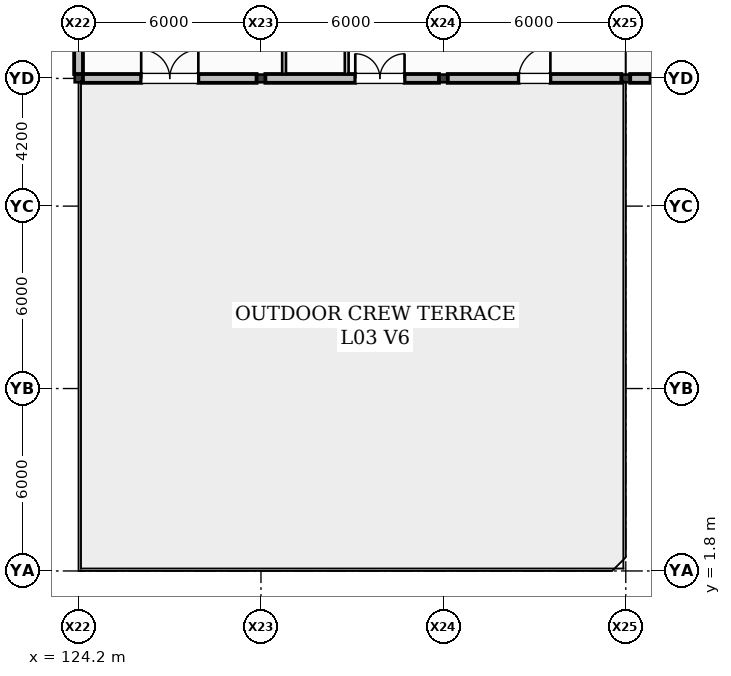
"""IFC4 building model, lengths in metres.
Left out: names, types, materials, properties, quantities, classifications, styles, units other than length and angle.
Written with IfcOpenShell. Run it as: python <this file> out.ifc"""

import sys

from ifc_helpers import new_model, si_unit, direction, frame, frame_2d, origin, origin_2d, place, context, subcontext, project, spatial, rectangle, i_section, extrude, element, fill, save


model = new_model("IFC4")
c1 = context("Model", 3, precision=1e-05, world=origin(), true_north=direction((0.0, 1.0)))
c2 = subcontext(c1, "Body", "Model", "MODEL_VIEW")
j1 = project(units=[si_unit("LENGTHUNIT", "METRE"), si_unit("PLANEANGLEUNIT", "RADIAN")], contexts=[c1])
p1 = place(None, origin())
s1 = spatial("IfcSite", under=j1, at=p1, CompositionType="ELEMENT")
p2 = place(p1, origin())
s2 = spatial("IfcBuilding", under=s1, at=p2, CompositionType="ELEMENT")
p3 = place(p2, frame((0.0, 0.0, 10.0)))
s3 = spatial("IfcBuildingStorey", under=s2, at=p3, CompositionType="ELEMENT", Elevation=10.0)
for number, where, z_axis, x_axis in (
    (1, (124.2, 18.0, 0.0), (0.0, 0.0, 1.0), (1.0, 0.0, 0.0)),
    (2, (130.2, 18.0, 0.0), (0.0, 0.0, 1.0), (1.0, 0.0, 0.0)),
    (3, (136.2, 18.0, 0.0), (0.0, 0.0, 1.0), (1.0, 0.0, 0.0)),
    (4, (142.2, 18.0, 0.0), (0.0, 0.0, 1.0), (1.0, 0.0, 0.0)),
):
    element("IfcColumn", number, at=place(p3, frame(where, z_axis=z_axis, x_axis=x_axis)), inside=s3, PredefinedType="COLUMN", context=c2, shape_type="SweptSolid", body=[
        extrude(i_section(OverallWidth=0.254, OverallDepth=0.253, WebThickness=0.009, FlangeThickness=0.014, at=origin_2d()), origin(), (0.0, 0.0, 1.0), 4.0),
    ])
p4 = place(p3, frame((124.345, 18.0, 0.0), z_axis=(0.0, 0.0, 1.0), x_axis=(1.0, 0.0, 0.0)))
e5 = element("IfcWall", 5, at=p4, inside=s3, PredefinedType="STANDARD", context=c2, shape_type="SweptSolid", body=[
    extrude(rectangle(XDim=5.71, YDim=0.29, at=frame_2d((2.855, 0.0))), origin(), (0.0, 0.0, 1.0), 4.0),
])
p5 = place(p4, frame((1.915, 0.0, 0.0)))
e6 = element("IfcOpeningElement", 6, at=p5, cuts=e5, PredefinedType="OPENING", context=c2, shape_type="SweptSolid", body=[
    extrude(rectangle(XDim=1.88, YDim=2.28, at=frame_2d((0.94, 1.14))), frame((0.0, 0.155, 0.0), z_axis=(0.0, -1.0, 0.0), x_axis=(1.0, 0.0, 0.0)), (0.0, 0.0, 1.0), 0.31),
])
p6 = place(p3, frame((130.345, 18.0, 0.0), z_axis=(0.0, 0.0, 1.0), x_axis=(1.0, 0.0, 0.0)))
e7 = element("IfcWall", 7, at=p6, inside=s3, PredefinedType="STANDARD", context=c2, shape_type="SweptSolid", body=[
    extrude(rectangle(XDim=5.71, YDim=0.29, at=frame_2d((2.855, 0.0))), origin(), (0.0, 0.0, 1.0), 4.0),
])
p7 = place(p6, frame((2.958, 0.0, 0.0)))
e8 = element("IfcOpeningElement", 8, at=p7, cuts=e7, PredefinedType="OPENING", context=c2, shape_type="SweptSolid", body=[
    extrude(rectangle(XDim=1.62, YDim=2.2, at=frame_2d((0.81, 1.1))), frame((0.0, 0.155, 0.0), z_axis=(0.0, -1.0, 0.0), x_axis=(1.0, 0.0, 0.0)), (0.0, 0.0, 1.0), 0.31),
])
p8 = place(p3, frame((136.345, 18.0, 0.0), z_axis=(0.0, 0.0, 1.0), x_axis=(1.0, 0.0, 0.0)))
e9 = element("IfcWall", 9, at=p8, inside=s3, PredefinedType="STANDARD", context=c2, shape_type="SweptSolid", body=[
    extrude(rectangle(XDim=5.71, YDim=0.29, at=frame_2d((2.855, 0.0))), origin(), (0.0, 0.0, 1.0), 4.0),
])
p9 = place(p8, frame((2.335, 0.0, 0.0)))
e10 = element("IfcOpeningElement", 10, at=p9, cuts=e9, PredefinedType="OPENING", context=c2, shape_type="SweptSolid", body=[
    extrude(rectangle(XDim=1.04, YDim=2.16, at=frame_2d((0.52, 1.08))), frame((0.0, 0.155, 0.0), z_axis=(0.0, -1.0, 0.0), x_axis=(1.0, 0.0, 0.0)), (0.0, 0.0, 1.0), 0.31),
])
p10 = place(p3, frame((142.345, 18.0, 0.0), z_axis=(0.0, 0.0, 1.0), x_axis=(1.0, 0.0, 0.0)))
e11 = element("IfcWall", 11, at=p10, inside=s3, PredefinedType="STANDARD", context=c2, shape_type="SweptSolid", body=[
    extrude(rectangle(XDim=5.71, YDim=0.29, at=frame_2d((2.855, 0.0))), origin(), (0.0, 0.0, 1.0), 4.0),
])
p11 = place(p10, frame((0.67, 0.0, 1.42)))
e12 = element("IfcOpeningElement", 12, at=p11, cuts=e11, PredefinedType="OPENING", context=c2, shape_type="SweptSolid", body=[
    extrude(rectangle(XDim=1.32, YDim=1.32, at=frame_2d((0.66, 0.66))), frame((0.0, 0.155, 0.0), z_axis=(0.0, -1.0, 0.0), x_axis=(1.0, 0.0, 0.0)), (0.0, 0.0, 1.0), 0.31),
])
p12 = place(p10, frame((3.504, 0.0, 1.28)))
e13 = element("IfcOpeningElement", 13, at=p12, cuts=e11, PredefinedType="OPENING", context=c2, shape_type="SweptSolid", body=[
    extrude(rectangle(XDim=1.56, YDim=1.56, at=frame_2d((0.78, 0.78))), frame((0.0, 0.155, 0.0), z_axis=(0.0, -1.0, 0.0), x_axis=(1.0, 0.0, 0.0)), (0.0, 0.0, 1.0), 0.31),
])
p13 = place(p3, frame((124.2, 23.855, 0.0), z_axis=(0.0, 0.0, 1.0), x_axis=(0.0, -1.0, 0.0)))
e14 = element("IfcWall", 14, at=p13, inside=s3, PredefinedType="STANDARD", context=c2, shape_type="SweptSolid", body=[
    extrude(rectangle(XDim=5.71, YDim=0.29, at=frame_2d((2.855, 0.0))), origin(), (0.0, 0.0, 1.0), 2.1),
])
p14 = place(p13, frame((1.092, 0.0, 0.82)))
e15 = element("IfcOpeningElement", 15, at=p14, cuts=e14, PredefinedType="OPENING", context=c2, shape_type="SweptSolid", body=[
    extrude(rectangle(XDim=0.96, YDim=0.96, at=frame_2d((0.48, 0.48))), frame((0.0, 0.155, 0.0), z_axis=(0.0, -1.0, 0.0), x_axis=(1.0, 0.0, 0.0)), (0.0, 0.0, 1.0), 0.31),
])
p15 = place(p2, frame((0.0, 0.0, 25.2)))
s4 = spatial("IfcBuildingStorey", under=s2, at=p15, CompositionType="ELEMENT", Elevation=25.2)
p16 = place(p15, frame((122.973, 18.0, -15.2), z_axis=(0.0, 0.0, 1.0), x_axis=(1.0, 0.0, 0.0)))
e16 = element("IfcWall", 16, at=p16, inside=s4, PredefinedType="STANDARD", context=c2, shape_type="SweptSolid", body=[
    extrude(rectangle(XDim=1.182, YDim=0.265, at=frame_2d((0.591, 0.0))), origin(), (0.0, 0.0, 1.0), 2.417),
])
p17 = place(p3, frame((130.96, 24.097, 0.0), z_axis=(0.0, 0.0, 1.0), x_axis=(0.0, -1.0, 0.0)))
e17 = element("IfcWall", 17, at=p17, inside=s3, PredefinedType="PARTITIONING", context=c2, shape_type="SweptSolid", body=[
    extrude(rectangle(XDim=5.952, YDim=0.125, at=frame_2d((2.976, 0.0))), origin(), (0.0, 0.0, 1.0), 3.74),
])
p18 = place(p3, frame((133.02, 18.145, 0.0), z_axis=(0.0, 0.0, 1.0), x_axis=(0.0, 1.0, 0.0)))
e18 = element("IfcWall", 18, at=p18, inside=s3, PredefinedType="PARTITIONING", context=c2, shape_type="SweptSolid", body=[
    extrude(rectangle(XDim=6.022, YDim=0.125, at=frame_2d((3.011, 0.0))), origin(), (0.0, 0.0, 1.0), 3.74),
])
p19 = place(p18, frame((2.447, 0.0, 0.0)))
e19 = element("IfcOpeningElement", 19, at=p19, cuts=e18, PredefinedType="OPENING", context=c2, shape_type="SweptSolid", body=[
    extrude(rectangle(XDim=0.9, YDim=2.1, at=frame_2d((0.45, 1.05))), frame((0.0, 0.073, 0.0), z_axis=(0.0, -1.0, 0.0), x_axis=(1.0, 0.0, 0.0)), (0.0, 0.0, 1.0), 0.145),
])
p20 = place(p5, frame((1.88, 0.0, 0.0), z_axis=(0.0, 0.0, 1.0), x_axis=(-1.0, 0.0, 0.0)))
e20 = element("IfcDoor", 20, at=p20, inside=s3, OperationType="DOUBLE_DOOR_SINGLE_SWING", PredefinedType="DOOR", context=c2, shape_type="SweptSolid", body=[
    extrude(rectangle(XDim=1.88, YDim=2.28, at=frame_2d((0.94, 1.14))), frame((0.0, 0.025, 0.0), z_axis=(0.0, -1.0, 0.0), x_axis=(1.0, 0.0, 0.0)), (0.0, 0.0, 1.0), 0.05),
])
fill(e6, e20)
p21 = place(p7, frame((1.62, 0.0, 0.0), z_axis=(0.0, 0.0, 1.0), x_axis=(-1.0, 0.0, 0.0)))
e21 = element("IfcDoor", 21, at=p21, inside=s3, OperationType="DOUBLE_DOOR_SINGLE_SWING", PredefinedType="DOOR", context=c2, shape_type="SweptSolid", body=[
    extrude(rectangle(XDim=1.62, YDim=2.2, at=frame_2d((0.81, 1.1))), frame((0.0, 0.025, 0.0), z_axis=(0.0, -1.0, 0.0), x_axis=(1.0, 0.0, 0.0)), (0.0, 0.0, 1.0), 0.05),
])
fill(e8, e21)
p22 = place(p9, frame((1.04, 0.0, 0.0), z_axis=(0.0, 0.0, 1.0), x_axis=(-1.0, 0.0, 0.0)))
e22 = element("IfcDoor", 22, at=p22, inside=s3, OperationType="SINGLE_SWING_RIGHT", PredefinedType="DOOR", context=c2, shape_type="SweptSolid", body=[
    extrude(rectangle(XDim=1.04, YDim=2.16, at=frame_2d((0.52, 1.08))), frame((0.0, 0.025, 0.0), z_axis=(0.0, -1.0, 0.0), x_axis=(1.0, 0.0, 0.0)), (0.0, 0.0, 1.0), 0.05),
])
fill(e10, e22)
p23 = place(p11, origin())
e23 = element("IfcWindow", 23, at=p23, inside=s3, PartitioningType="SINGLE_PANEL", PredefinedType="WINDOW", context=c2, shape_type="SweptSolid", body=[
    extrude(rectangle(XDim=1.32, YDim=1.32, at=frame_2d((0.66, 0.66))), frame((0.0, 0.03, 0.0), z_axis=(0.0, -1.0, 0.0), x_axis=(1.0, 0.0, 0.0)), (0.0, 0.0, 1.0), 0.06),
])
fill(e12, e23)
save(model, sys.argv[1])
